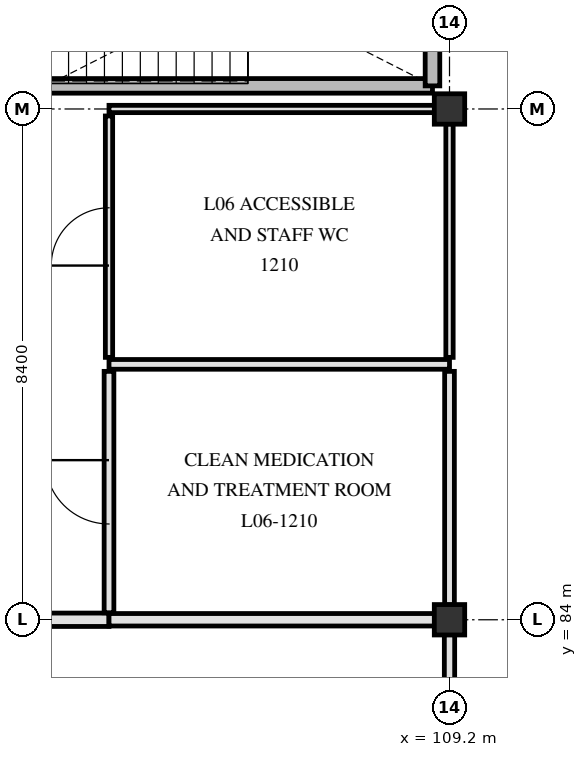
"""IFC4 building model, lengths in metres.
Left out: names, types, materials, properties, quantities, classifications, styles, units other than length and angle.
Written with IfcOpenShell. Run it as: python <this file> out.ifc"""

import sys

from ifc_helpers import new_model, si_unit, direction, frame, frame_2d, origin, origin_2d, place, context, subcontext, project, spatial, rectangle, extrude, element, fill, save


model = new_model("IFC4")
c1 = context("Model", 3, precision=1e-05, world=origin(), true_north=direction((0.0, 1.0)))
c2 = subcontext(c1, "Body", "Model", "MODEL_VIEW")
j1 = project(units=[si_unit("LENGTHUNIT", "METRE"), si_unit("PLANEANGLEUNIT", "RADIAN")], contexts=[c1])
p1 = place(None, origin())
s1 = spatial("IfcSite", under=j1, at=p1, CompositionType="ELEMENT")
p2 = place(p1, origin())
s2 = spatial("IfcBuilding", under=s1, at=p2, CompositionType="ELEMENT")
p3 = place(p2, frame((0.0, 0.0, 26.4)))
s3 = spatial("IfcBuildingStorey", under=s2, at=p3, CompositionType="ELEMENT", Elevation=26.4)
for number, where, z_axis, x_axis in (
    (1, (109.2, 84.0, 0.0), (0.0, 0.0, 1.0), (1.0, 0.0, 0.0)),
    (2, (109.2, 92.4, 0.0), (0.0, 0.0, 1.0), (1.0, 0.0, 0.0)),
):
    element("IfcColumn", number, at=place(p3, frame(where, z_axis=z_axis, x_axis=x_axis)), inside=s3, PredefinedType="COLUMN", context=c2, shape_type="SweptSolid", body=[
        extrude(rectangle(XDim=0.5, YDim=0.5, at=origin_2d()), origin(), (0.0, 0.0, 1.0), 3.9),
    ])
p4 = place(p3, frame((101.1, 92.78, 0.0), z_axis=(0.0, 0.0, 1.0), x_axis=(1.0, 0.0, 0.0)))
e3 = element("IfcWall", 3, at=p4, inside=s3, PredefinedType="SHEAR", context=c2, shape_type="SweptSolid", body=[
    extrude(rectangle(XDim=7.82, YDim=0.24, at=frame_2d((3.91, 0.0))), origin(), (0.0, 0.0, 1.0), 3.62),
])
p5 = place(p3, frame((108.92, 92.78, 0.0), z_axis=(0.0, 0.0, 1.0), x_axis=(0.0, 1.0, 0.0)))
e4 = element("IfcWall", 4, at=p5, inside=s3, PredefinedType="SHEAR", context=c2, shape_type="SweptSolid", body=[
    extrude(rectangle(XDim=3.32, YDim=0.24, at=frame_2d((1.66, 0.0))), origin(), (0.0, 0.0, 1.0), 3.62),
])
p6 = place(p3, frame((101.045, 84.0, 0.0), z_axis=(0.0, 0.0, 1.0), x_axis=(1.0, 0.0, 0.0)))
e5 = element("IfcWall", 5, at=p6, inside=s3, PredefinedType="PARTITIONING", context=c2, shape_type="SweptSolid", body=[
    extrude(rectangle(XDim=2.555, YDim=0.22, at=frame_2d((1.278, 0.0))), origin(), (0.0, 0.0, 1.0), 3.21),
])
p7 = place(p3, frame((103.6, 84.0, 0.0), z_axis=(0.0, 0.0, 1.0), x_axis=(1.0, 0.0, 0.0)))
e6 = element("IfcWall", 6, at=p7, inside=s3, PredefinedType="PARTITIONING", context=c2, shape_type="SweptSolid", body=[
    extrude(rectangle(XDim=5.355, YDim=0.205, at=frame_2d((2.677, 0.0))), origin(), (0.0, 0.0, 1.0), 3.21),
])
p8 = place(p3, frame((103.6, 88.2, 0.0), z_axis=(0.0, 0.0, 1.0), x_axis=(1.0, 0.0, 0.0)))
e7 = element("IfcWall", 7, at=p8, inside=s3, PredefinedType="PARTITIONING", context=c2, shape_type="SweptSolid", body=[
    extrude(rectangle(XDim=5.6, YDim=0.16, at=frame_2d((2.8, 0.0))), origin(), (0.0, 0.0, 1.0), 3.21),
])
p9 = place(p3, frame((103.6, 92.4, 0.0), z_axis=(0.0, 0.0, 1.0), x_axis=(1.0, 0.0, 0.0)))
e8 = element("IfcWall", 8, at=p9, inside=s3, PredefinedType="PARTITIONING", context=c2, shape_type="SweptSolid", body=[
    extrude(rectangle(XDim=5.355, YDim=0.12, at=frame_2d((2.677, 0.0))), origin(), (0.0, 0.0, 1.0), 3.21),
])
p10 = place(p3, frame((103.6, 84.115, 0.0), z_axis=(0.0, 0.0, 1.0), x_axis=(0.0, 1.0, 0.0)))
e9 = element("IfcWall", 9, at=p10, inside=s3, PredefinedType="PARTITIONING", context=c2, shape_type="SweptSolid", body=[
    extrude(rectangle(XDim=3.97, YDim=0.16, at=frame_2d((1.985, 0.0))), origin(), (0.0, 0.0, 1.0), 3.34),
])
p11 = place(p10, frame((1.46, 0.0, 0.0)))
e10 = element("IfcOpeningElement", 10, at=p11, cuts=e9, PredefinedType="OPENING", context=c2, shape_type="SweptSolid", body=[
    extrude(rectangle(XDim=1.05, YDim=2.15, at=frame_2d((0.525, 1.075))), frame((0.0, 0.09, 0.0), z_axis=(0.0, -1.0, 0.0), x_axis=(1.0, 0.0, 0.0)), (0.0, 0.0, 1.0), 0.18),
])
p12 = place(p3, frame((103.6, 88.315, 0.0), z_axis=(0.0, 0.0, 1.0), x_axis=(0.0, 1.0, 0.0)))
e11 = element("IfcWall", 11, at=p12, inside=s3, PredefinedType="PARTITIONING", context=c2, shape_type="SweptSolid", body=[
    extrude(rectangle(XDim=3.97, YDim=0.12, at=frame_2d((1.985, 0.0))), origin(), (0.0, 0.0, 1.0), 3.34),
])
p13 = place(p12, frame((1.51, 0.0, 0.0)))
e12 = element("IfcOpeningElement", 12, at=p13, cuts=e11, PredefinedType="OPENING", context=c2, shape_type="SweptSolid", body=[
    extrude(rectangle(XDim=0.95, YDim=2.1, at=frame_2d((0.475, 1.05))), frame((0.0, 0.07, 0.0), z_axis=(0.0, -1.0, 0.0), x_axis=(1.0, 0.0, 0.0)), (0.0, 0.0, 1.0), 0.14),
])
p14 = place(p3, frame((109.2, 78.315, 0.0), z_axis=(0.0, 0.0, 1.0), x_axis=(0.0, 1.0, 0.0)))
e13 = element("IfcWall", 13, at=p14, inside=s3, PredefinedType="PARTITIONING", context=c2, shape_type="SweptSolid", body=[
    extrude(rectangle(XDim=5.44, YDim=0.17, at=frame_2d((2.72, 0.0))), origin(), (0.0, 0.0, 1.0), 3.21),
])
p15 = place(p3, frame((109.2, 84.245, 0.0), z_axis=(0.0, 0.0, 1.0), x_axis=(0.0, 1.0, 0.0)))
e14 = element("IfcWall", 14, at=p15, inside=s3, PredefinedType="PARTITIONING", context=c2, shape_type="SweptSolid", body=[
    extrude(rectangle(XDim=3.84, YDim=0.16, at=frame_2d((1.92, 0.0))), origin(), (0.0, 0.0, 1.0), 3.21),
])
p16 = place(p3, frame((109.2, 88.315, 0.0), z_axis=(0.0, 0.0, 1.0), x_axis=(0.0, 1.0, 0.0)))
e15 = element("IfcWall", 15, at=p16, inside=s3, PredefinedType="PARTITIONING", context=c2, shape_type="SweptSolid", body=[
    extrude(rectangle(XDim=3.84, YDim=0.12, at=frame_2d((1.92, 0.0))), origin(), (0.0, 0.0, 1.0), 3.21),
])
p17 = place(p11, origin())
e16 = element("IfcDoor", 16, at=p17, inside=s3, OperationType="SINGLE_SWING_RIGHT", PredefinedType="DOOR", context=c2, shape_type="SweptSolid", body=[
    extrude(rectangle(XDim=1.05, YDim=2.15, at=frame_2d((0.525, 1.075))), frame((0.0, 0.025, 0.0), z_axis=(0.0, -1.0, 0.0), x_axis=(1.0, 0.0, 0.0)), (0.0, 0.0, 1.0), 0.05),
])
fill(e10, e16)
p18 = place(p13, origin())
e17 = element("IfcDoor", 17, at=p18, inside=s3, OperationType="SINGLE_SWING_LEFT", PredefinedType="DOOR", context=c2, shape_type="SweptSolid", body=[
    extrude(rectangle(XDim=0.95, YDim=2.1, at=frame_2d((0.475, 1.05))), frame((0.0, 0.025, 0.0), z_axis=(0.0, -1.0, 0.0), x_axis=(1.0, 0.0, 0.0)), (0.0, 0.0, 1.0), 0.05),
])
fill(e12, e17)
save(model, sys.argv[1])
